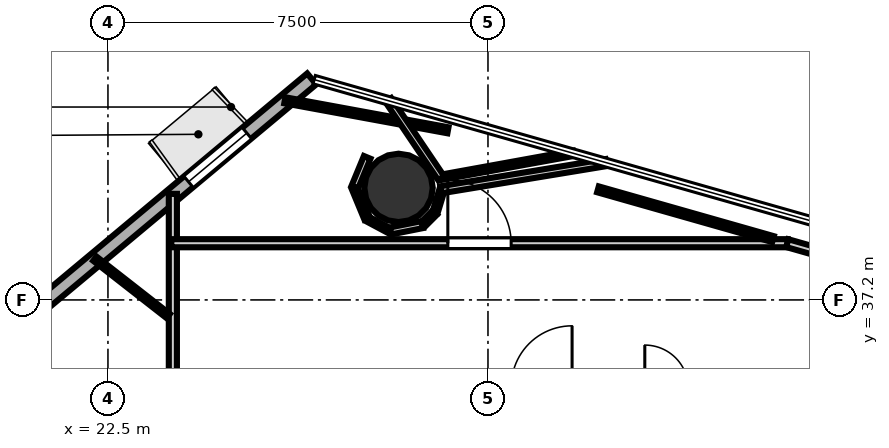
"""IFC4 building model, lengths in metres.
Left out: names, types, materials, properties, quantities, classifications, styles, units other than length and angle.
Written with IfcOpenShell. Run it as: python <this file> out.ifc"""

import sys

from ifc_helpers import new_model, si_unit, direction, frame, frame_2d, origin, origin_2d, place, context, subcontext, project, spatial, rectangle, hollow_circle, extrude, element, fill, save


model = new_model("IFC4")
c1 = context("Model", 3, precision=1e-05, world=origin(), true_north=direction((0.0, 1.0)))
c2 = subcontext(c1, "Body", "Model", "MODEL_VIEW")
j1 = project(units=[si_unit("LENGTHUNIT", "METRE"), si_unit("PLANEANGLEUNIT", "RADIAN")], contexts=[c1])
p1 = place(None, origin())
s1 = spatial("IfcSite", under=j1, at=p1, CompositionType="ELEMENT")
p2 = place(p1, origin())
s2 = spatial("IfcBuilding", under=s1, at=p2, CompositionType="ELEMENT")
p3 = place(p2, frame((0.0, 0.0, 180.9)))
s3 = spatial("IfcBuildingStorey", under=s2, at=p3, CompositionType="ELEMENT", Elevation=180.9)
p4 = place(p3, frame((28.235, 39.411, 0.0), z_axis=(0.0, 0.0, 1.0), x_axis=(1.0, 0.0, 0.0)))
e1 = element("IfcColumn", 1, at=p4, inside=s3, PredefinedType="COLUMN", context=c2, shape_type="SweptSolid", body=[
    extrude(hollow_circle(Radius=0.675, WallThickness=0.032, at=origin_2d()), origin(), (0.0, 0.0, 1.0), 3.7),
])
p5 = place(p3, frame((26.522, 41.562, 0.0), z_axis=(0.0, 0.0, 1.0), x_axis=(-0.767540623089, -0.6410003057, 0.0)))
e2 = element("IfcWall", 2, at=p5, inside=s3, PredefinedType="SOLIDWALL", context=c2, shape_type="SweptSolid", body=[
    extrude(rectangle(XDim=8.061, YDim=0.28, at=frame_2d((4.03, 0.0))), origin(), (0.0, 0.0, 1.0), 3.4),
])
p6 = place(p5, frame((1.668, 0.0, 0.85)))
e3 = element("IfcOpeningElement", 3, at=p6, cuts=e2, PredefinedType="OPENING", context=c2, shape_type="SweptSolid", body=[
    extrude(rectangle(XDim=1.5, YDim=2.1, at=frame_2d((0.75, 1.05))), frame((0.0, 0.15, 0.0), z_axis=(0.0, -1.0, 0.0), x_axis=(1.0, 0.0, 0.0)), (0.0, 0.0, 1.0), 0.3),
])
p7 = place(p3, frame((23.781, 25.762, 0.0), z_axis=(0.0, 0.0, 1.0), x_axis=(0.0, 1.0, 0.0)))
e4 = element("IfcWall", 4, at=p7, inside=s3, PredefinedType="PARTITIONING", context=c2, shape_type="SweptSolid", body=[
    extrude(rectangle(XDim=13.531, YDim=0.16, at=frame_2d((6.766, 0.0))), origin(), (0.0, 0.0, 1.0), 2.72),
])
p8 = place(p7, frame((5.302, 0.0, 0.0)))
e5 = element("IfcOpeningElement", 5, at=p8, cuts=e4, PredefinedType="OPENING", context=c2, shape_type="SweptSolid", body=[
    extrude(rectangle(XDim=1.25, YDim=2.2, at=frame_2d((0.625, 1.1))), frame((0.0, 0.09, 0.0), z_axis=(0.0, -1.0, 0.0), x_axis=(1.0, 0.0, 0.0)), (0.0, 0.0, 1.0), 0.18),
])
p9 = place(p3, frame((23.75, 38.319, 0.0), z_axis=(0.0, 0.0, 1.0), x_axis=(1.0, 0.0, 0.0)))
e6 = element("IfcWall", 6, at=p9, inside=s3, PredefinedType="PARTITIONING", context=c2, shape_type="SweptSolid", body=[
    extrude(rectangle(XDim=12.165, YDim=0.16, at=frame_2d((6.083, 0.0))), origin(), (0.0, 0.0, 1.0), 2.72),
])
p10 = place(p9, frame((5.458, 0.0, 0.0)))
e7 = element("IfcOpeningElement", 7, at=p10, cuts=e6, PredefinedType="OPENING", context=c2, shape_type="SweptSolid", body=[
    extrude(rectangle(XDim=1.25, YDim=2.2, at=frame_2d((0.625, 1.1))), frame((0.0, 0.09, 0.0), z_axis=(0.0, -1.0, 0.0), x_axis=(1.0, 0.0, 0.0)), (0.0, 0.0, 1.0), 0.18),
])
p11 = place(p3, frame((35.907, 38.32, 0.0), z_axis=(0.0, 0.0, 1.0), x_axis=(0.96183190349, -0.273640986382, 0.0)))
e8 = element("IfcWall", 8, at=p11, inside=s3, PredefinedType="PARTITIONING", context=c2, shape_type="SweptSolid", body=[
    extrude(rectangle(XDim=1.284, YDim=0.16, at=frame_2d((0.642, 0.0))), origin(), (0.0, 0.0, 1.0), 2.72),
])
p12 = place(p3, frame((23.689, 36.883, 0.0), z_axis=(0.0, 0.0, 1.0), x_axis=(-0.788004213501, 0.615669846188, 0.0)))
e9 = element("IfcWall", 9, at=p12, inside=s3, PredefinedType="PARTITIONING", context=c2, shape_type="SweptSolid", body=[
    extrude(rectangle(XDim=1.836, YDim=0.105, at=frame_2d((0.918, 0.0))), origin(), (0.0, 0.0, 1.0), 2.72),
])
p13 = place(p3, frame((25.991, 41.14, 0.0), z_axis=(0.0, 0.0, 1.0), x_axis=(0.983503861059, -0.180887134097, 0.0)))
e10 = element("IfcWall", 10, at=p13, inside=s3, PredefinedType="PARTITIONING", context=c2, shape_type="SweptSolid", body=[
    extrude(rectangle(XDim=3.273, YDim=0.12, at=frame_2d((1.636, 0.0))), origin(), (0.0, 0.0, 1.0), 2.72),
])
p14 = place(p3, frame((31.686, 40.093, 0.0), z_axis=(0.0, 0.0, 1.0), x_axis=(-0.983955857051, -0.17841208304, 0.0)))
e11 = element("IfcWall", 11, at=p14, inside=s3, PredefinedType="PARTITIONING", context=c2, shape_type="SweptSolid", body=[
    extrude(rectangle(XDim=2.678, YDim=0.105, at=frame_2d((1.339, 0.0))), origin(), (0.0, 0.0, 1.0), 2.72),
])
p15 = place(p3, frame((29.076, 39.602, 0.0), z_axis=(0.0, 0.0, 1.0), x_axis=(-0.559772269406, 0.828646490612, 0.0)))
e12 = element("IfcWall", 12, at=p15, inside=s3, PredefinedType="PARTITIONING", context=c2, shape_type="SweptSolid", body=[
    extrude(rectangle(XDim=1.862, YDim=0.14, at=frame_2d((0.931, 0.0))), origin(), (0.0, 0.0, 1.0), 2.72),
])
p16 = place(p3, frame((27.616, 40.013, 0.0), z_axis=(0.0, 0.0, 1.0), x_axis=(-0.382824178437, -0.923821221018, 0.0)))
e13 = element("IfcWall", 13, at=p16, inside=s3, PredefinedType="PARTITIONING", context=c2, shape_type="SweptSolid", body=[
    extrude(rectangle(XDim=0.639, YDim=0.14, at=frame_2d((0.319, 0.0))), origin(), (0.0, 0.0, 1.0), 2.72),
])
p17 = place(p3, frame((27.371, 39.399, 0.0), z_axis=(0.0, 0.0, 1.0), x_axis=(0.38268910224, -0.923877183952, 0.0)))
e14 = element("IfcWall", 14, at=p17, inside=s3, PredefinedType="PARTITIONING", context=c2, shape_type="SweptSolid", body=[
    extrude(rectangle(XDim=0.639, YDim=0.12, at=frame_2d((0.32, 0.0))), origin(), (0.0, 0.0, 1.0), 2.72),
])
p18 = place(p3, frame((27.63, 38.793, 0.0), z_axis=(0.0, 0.0, 1.0), x_axis=(0.882018256262, -0.471215232798, 0.0)))
e15 = element("IfcWall", 15, at=p18, inside=s3, PredefinedType="PARTITIONING", context=c2, shape_type="SweptSolid", body=[
    extrude(rectangle(XDim=0.485, YDim=0.105, at=frame_2d((0.242, 0.0))), origin(), (0.0, 0.0, 1.0), 2.72),
])
p19 = place(p3, frame((28.078, 38.562, 0.0), z_axis=(0.0, 0.0, 1.0), x_axis=(0.98075661624, 0.195234371211, 0.0)))
e16 = element("IfcWall", 16, at=p19, inside=s3, PredefinedType="PARTITIONING", context=c2, shape_type="SweptSolid", body=[
    extrude(rectangle(XDim=0.639, YDim=0.14, at=frame_2d((0.319, 0.0))), origin(), (0.0, 0.0, 1.0), 2.72),
])
p20 = place(p3, frame((28.721, 38.695, 0.0), z_axis=(0.0, 0.0, 1.0), x_axis=(0.707106781187, 0.707106781187, 0.0)))
e17 = element("IfcWall", 17, at=p20, inside=s3, PredefinedType="PARTITIONING", context=c2, shape_type="SweptSolid", body=[
    extrude(rectangle(XDim=0.326, YDim=0.12, at=frame_2d((0.163, 0.0))), origin(), (0.0, 0.0, 1.0), 2.72),
])
p21 = place(p3, frame((28.959, 38.938, 0.0), z_axis=(0.0, 0.0, 1.0), x_axis=(0.292866596221, 0.956153312402, 0.0)))
e18 = element("IfcWall", 18, at=p21, inside=s3, PredefinedType="PARTITIONING", context=c2, shape_type="SweptSolid", body=[
    extrude(rectangle(XDim=0.479, YDim=0.105, at=frame_2d((0.239, 0.0))), origin(), (0.0, 0.0, 1.0), 2.72),
])
p22 = place(p3, frame((29.069, 39.374, 0.0), z_axis=(0.0, 0.0, 1.0), x_axis=(0.986723423686, 0.162409621481, 0.0)))
e19 = element("IfcWall", 19, at=p22, inside=s3, PredefinedType="PARTITIONING", context=c2, shape_type="SweptSolid", body=[
    extrude(rectangle(XDim=3.304, YDim=0.14, at=frame_2d((1.652, 0.0))), origin(), (0.0, 0.0, 1.0), 2.72),
])
p23 = place(p3, frame((32.171, 39.383, 0.0), z_axis=(0.0, 0.0, 1.0), x_axis=(0.96186181525, -0.273535826471, 0.0)))
e20 = element("IfcWall", 20, at=p23, inside=s3, PredefinedType="PARTITIONING", context=c2, shape_type="SweptSolid", body=[
    extrude(rectangle(XDim=3.592, YDim=0.12, at=frame_2d((1.796, 0.0))), origin(), (0.0, 0.0, 1.0), 2.72),
])
p24 = place(p3, frame((22.259, 25.117, 0.0), z_axis=(0.0, 0.0, 1.0), x_axis=(-0.121339817711, 0.992611025849, 0.0)))
e21 = element("IfcWall", 21, at=p24, inside=s3, PredefinedType="PARTITIONING", context=c2, shape_type="SweptSolid", body=[
    extrude(rectangle(XDim=11.799, YDim=0.14, at=frame_2d((5.899, 0.0))), origin(), (0.0, 0.0, 1.0), 2.72),
])
p25 = place(p10, origin())
e22 = element("IfcDoor", 22, at=p25, inside=s3, OperationType="SINGLE_SWING_LEFT", PredefinedType="DOOR", context=c2, shape_type="SweptSolid", body=[
    extrude(rectangle(XDim=1.25, YDim=2.2, at=frame_2d((0.625, 1.1))), frame((0.0, 0.025, 0.0), z_axis=(0.0, -1.0, 0.0), x_axis=(1.0, 0.0, 0.0)), (0.0, 0.0, 1.0), 0.05),
])
fill(e7, e22)
p26 = place(p6, origin())
e23 = element("IfcWindow", 23, at=p26, inside=s3, PartitioningType="SINGLE_PANEL", PredefinedType="WINDOW", context=c2, shape_type="SweptSolid", body=[
    extrude(rectangle(XDim=1.5, YDim=2.1, at=frame_2d((0.75, 1.05))), frame((0.0, 0.03, 0.0), z_axis=(0.0, -1.0, 0.0), x_axis=(1.0, 0.0, 0.0)), (0.0, 0.0, 1.0), 0.06),
])
fill(e3, e23)
save(model, sys.argv[1])
